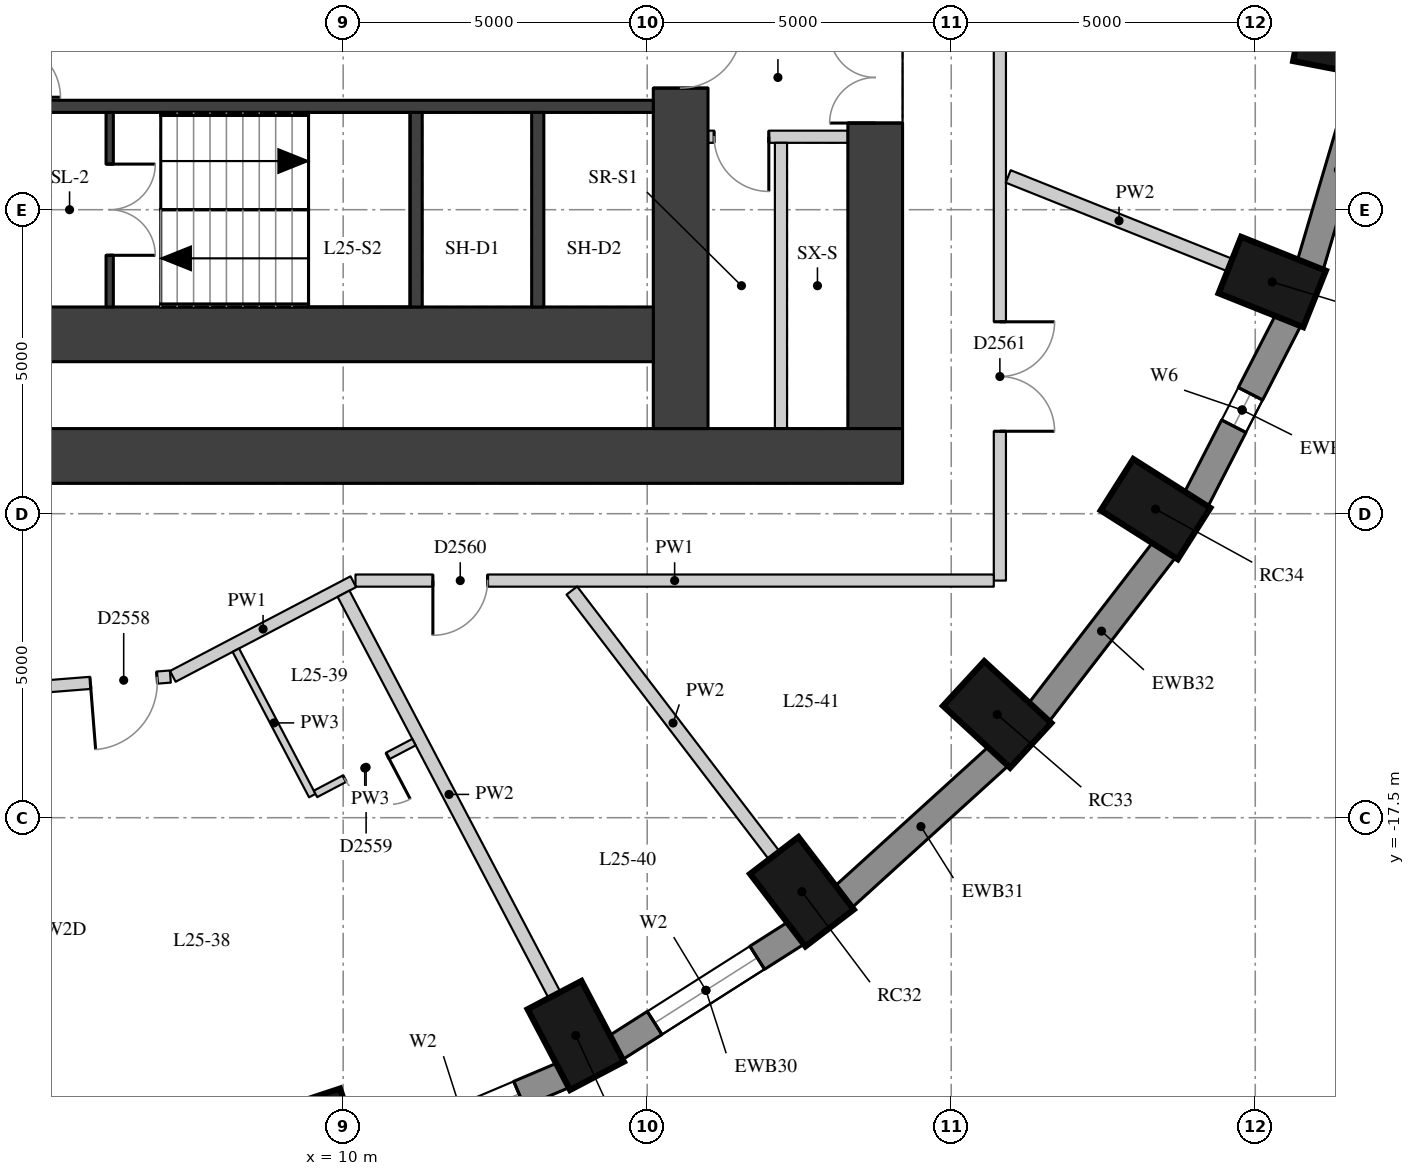
"""IFC4 building model, lengths in metres.
Left out: names, types, materials, properties, quantities, classifications, styles, units other than length and angle.
Written with IfcOpenShell. Run it as: python <this file> out.ifc"""

import sys

from ifc_helpers import new_model, si_unit, direction, frame, frame_2d, origin, origin_2d, place, context, subcontext, project, spatial, rectangle, extrude, element, fill, save


model = new_model("IFC4")
c1 = context("Model", 3, precision=1e-05, world=origin(), true_north=direction((0.0, 1.0)))
c2 = subcontext(c1, "Body", "Model", "MODEL_VIEW")
j1 = project(units=[si_unit("LENGTHUNIT", "METRE"), si_unit("PLANEANGLEUNIT", "RADIAN")], contexts=[c1])
p1 = place(None, origin())
s1 = spatial("IfcSite", under=j1, at=p1, CompositionType="ELEMENT")
p2 = place(p1, origin())
s2 = spatial("IfcBuilding", under=s1, at=p2, CompositionType="ELEMENT")
p3 = place(p2, frame((0.0, 0.0, 92.2)))
s3 = spatial("IfcBuildingStorey", under=s2, at=p3, CompositionType="ELEMENT", Elevation=92.2)
for number, where, z_axis, x_axis in (
    (1, (9.71, -22.824, 0.0), (0.0, 0.0, 1.0), (0.315, -0.949, 0.0)),
    (2, (13.825, -21.082, 0.0), (0.0, 0.0, 1.0), (0.465, -0.885, 0.0)),
    (3, (17.545, -18.717, 0.0), (0.0, 0.0, 1.0), (0.607, -0.795, 0.0)),
    (4, (20.755, -15.802, 0.0), (0.0, 0.0, 1.0), (0.735, -0.678, 0.0)),
    (5, (23.36, -12.425, 0.0), (0.0, 0.0, 1.0), (0.845, -0.536, 0.0)),
    (6, (25.279, -8.689, 0.0), (0.0, 0.0, 1.0), (0.929, -0.371, 0.0)),
    (7, (26.454, -4.707, 0.0), (0.0, 0.0, 1.0), (0.982, -0.19, 0.0)),
):
    element("IfcColumn", number, at=place(p3, frame(where, z_axis=z_axis, x_axis=x_axis)), inside=s3, PredefinedType="COLUMN", context=c2, shape_type="SweptSolid", body=[
        extrude(rectangle(XDim=1.5, YDim=1.0, at=origin_2d()), origin(), (0.0, 0.0, 1.0), 3.3),
    ])
p4 = place(p3, frame((10.318, -23.134, 0.0), z_axis=(0.0, 0.0, 1.0), x_axis=(0.920869643542, 0.389870619055, 0.0)))
e8 = element("IfcWall", 8, at=p4, inside=s3, PredefinedType="SOLIDWALL", context=c2, shape_type="SweptSolid", body=[
    extrude(rectangle(XDim=3.591, YDim=0.45, at=frame_2d((1.796, 0.0))), origin(), (0.0, 0.0, 1.0), 3.02),
])
p5 = place(p4, frame((0.796, 0.0, 0.4)))
e9 = element("IfcOpeningElement", 9, at=p5, cuts=e8, PredefinedType="OPENING", context=c2, shape_type="SweptSolid", body=[
    extrude(rectangle(XDim=2.0, YDim=1.75, at=frame_2d((1.0, 0.875))), frame((0.0, 0.235, 0.0), z_axis=(0.0, -1.0, 0.0), x_axis=(1.0, 0.0, 0.0)), (0.0, 0.0, 1.0), 0.47),
])
p6 = place(p3, frame((14.475, -21.287, 0.0), z_axis=(0.0, 0.0, 1.0), x_axis=(0.843911841423, 0.536481876587, 0.0)))
e10 = element("IfcWall", 10, at=p6, inside=s3, PredefinedType="SOLIDWALL", context=c2, shape_type="SweptSolid", body=[
    extrude(rectangle(XDim=3.532, YDim=0.45, at=frame_2d((1.766, 0.0))), origin(), (0.0, 0.0, 1.0), 3.02),
])
p7 = place(p6, frame((0.766, 0.0, 0.4)))
e11 = element("IfcOpeningElement", 11, at=p7, cuts=e10, PredefinedType="OPENING", context=c2, shape_type="SweptSolid", body=[
    extrude(rectangle(XDim=2.0, YDim=1.75, at=frame_2d((1.0, 0.875))), frame((0.0, 0.235, 0.0), z_axis=(0.0, -1.0, 0.0), x_axis=(1.0, 0.0, 0.0)), (0.0, 0.0, 1.0), 0.47),
])
p8 = place(p3, frame((18.219, -18.81, 0.0), z_axis=(0.0, 0.0, 1.0), x_axis=(0.740364106106, 0.672206062446, 0.0)))
e12 = element("IfcWall", 12, at=p8, inside=s3, PredefinedType="SOLIDWALL", context=c2, shape_type="SweptSolid", body=[
    extrude(rectangle(XDim=3.464, YDim=0.45, at=frame_2d((1.732, 0.0))), origin(), (0.0, 0.0, 1.0), 3.02),
])
p9 = place(p3, frame((21.435, -15.775, 0.0), z_axis=(0.0, 0.0, 1.0), x_axis=(0.610693945156, 0.791866721961, 0.0)))
e13 = element("IfcWall", 13, at=p9, inside=s3, PredefinedType="SOLIDWALL", context=c2, shape_type="SweptSolid", body=[
    extrude(rectangle(XDim=3.395, YDim=0.45, at=frame_2d((1.697, 0.0))), origin(), (0.0, 0.0, 1.0), 3.02),
])
p10 = place(p3, frame((24.023, -12.277, 0.0), z_axis=(0.0, 0.0, 1.0), x_axis=(0.456828186229, 0.889554949549, 0.0)))
e14 = element("IfcWall", 14, at=p10, inside=s3, PredefinedType="SOLIDWALL", context=c2, shape_type="SweptSolid", body=[
    extrude(rectangle(XDim=3.333, YDim=0.45, at=frame_2d((1.667, 0.0))), origin(), (0.0, 0.0, 1.0), 3.02),
])
p11 = place(p10, frame((1.366, 0.0, 0.4)))
e15 = element("IfcOpeningElement", 15, at=p11, cuts=e14, PredefinedType="OPENING", context=c2, shape_type="SweptSolid", body=[
    extrude(rectangle(XDim=0.6, YDim=1.75, at=frame_2d((0.3, 0.875))), frame((0.0, 0.235, 0.0), z_axis=(0.0, -1.0, 0.0), x_axis=(1.0, 0.0, 0.0)), (0.0, 0.0, 1.0), 0.47),
])
p12 = place(p3, frame((25.902, -8.421, 0.0), z_axis=(0.0, 0.0, 1.0), x_axis=(0.282982737009, 0.95912500257, 0.0)))
e16 = element("IfcWall", 16, at=p12, inside=s3, PredefinedType="SOLIDWALL", context=c2, shape_type="SweptSolid", body=[
    extrude(rectangle(XDim=3.286, YDim=0.45, at=frame_2d((1.643, 0.0))), origin(), (0.0, 0.0, 1.0), 3.02),
])
p13 = place(p3, frame((18.75, -11.1, 0.0), z_axis=(0.0, 0.0, 1.0), x_axis=(0.0, 1.0, 0.0)))
e17 = element("IfcWall", 17, at=p13, inside=s3, PredefinedType="SHEAR", context=c2, shape_type="SweptSolid", body=[
    extrude(rectangle(XDim=22.2, YDim=0.9, at=frame_2d((11.1, 0.0))), origin(), (0.0, 0.0, 1.0), 3.02),
])
p14 = place(p13, frame((16.175, 0.0, 0.0)))
e18 = element("IfcOpeningElement", 18, at=p14, cuts=e17, PredefinedType="OPENING", context=c2, shape_type="SweptSolid", body=[
    extrude(rectangle(XDim=1.5, YDim=2.1, at=frame_2d((0.75, 1.05))), frame((0.0, 0.46, 0.0), z_axis=(0.0, -1.0, 0.0), x_axis=(1.0, 0.0, 0.0)), (0.0, 0.0, 1.0), 0.92),
])
p15 = place(p13, frame((5.025, 0.0, 0.0)))
e19 = element("IfcOpeningElement", 19, at=p15, cuts=e17, PredefinedType="OPENING", context=c2, shape_type="SweptSolid", body=[
    extrude(rectangle(XDim=1.5, YDim=2.1, at=frame_2d((0.75, 1.05))), frame((0.0, 0.46, 0.0), z_axis=(0.0, -1.0, 0.0), x_axis=(1.0, 0.0, 0.0)), (0.0, 0.0, 1.0), 0.92),
])
p16 = place(p3, frame((4.0, -11.55, 0.0), z_axis=(0.0, 0.0, 1.0), x_axis=(1.0, 0.0, 0.0)))
e20 = element("IfcWall", 20, at=p16, inside=s3, PredefinedType="SHEAR", context=c2, shape_type="SweptSolid", body=[
    extrude(rectangle(XDim=15.2, YDim=0.9, at=frame_2d((7.6, 0.0))), origin(), (0.0, 0.0, 1.0), 3.02),
])
p17 = place(p3, frame((15.55, -11.1, 0.0), z_axis=(0.0, 0.0, 1.0), x_axis=(0.0, 1.0, 0.0)))
e21 = element("IfcWall", 21, at=p17, inside=s3, PredefinedType="SHEAR", context=c2, shape_type="SweptSolid", body=[
    extrude(rectangle(XDim=22.2, YDim=0.9, at=frame_2d((11.1, 0.0))), origin(), (0.0, 0.0, 1.0), 3.02),
])
p18 = place(p17, frame((15.6, 0.0, 0.0)))
e22 = element("IfcOpeningElement", 22, at=p18, cuts=e21, PredefinedType="OPENING", context=c2, shape_type="SweptSolid", body=[
    extrude(rectangle(XDim=1.0, YDim=2.1, at=frame_2d((0.5, 1.05))), frame((0.0, 0.46, 0.0), z_axis=(0.0, -1.0, 0.0), x_axis=(1.0, 0.0, 0.0)), (0.0, 0.0, 1.0), 0.92),
])
p19 = place(p17, frame((5.6, 0.0, 0.0)))
e23 = element("IfcOpeningElement", 23, at=p19, cuts=e21, PredefinedType="OPENING", context=c2, shape_type="SweptSolid", body=[
    extrude(rectangle(XDim=1.0, YDim=2.1, at=frame_2d((0.5, 1.05))), frame((0.0, 0.46, 0.0), z_axis=(0.0, -1.0, 0.0), x_axis=(1.0, 0.0, 0.0)), (0.0, 0.0, 1.0), 0.92),
])
p20 = place(p3, frame((4.9, -9.55, 0.0), z_axis=(0.0, 0.0, 1.0), x_axis=(1.0, 0.0, 0.0)))
e24 = element("IfcWall", 24, at=p20, inside=s3, PredefinedType="SHEAR", context=c2, shape_type="SweptSolid", body=[
    extrude(rectangle(XDim=10.2, YDim=0.9, at=frame_2d((5.1, 0.0))), origin(), (0.0, 0.0, 1.0), 3.02),
])
p21 = place(p3, frame((4.9, -5.8, 0.0), z_axis=(0.0, 0.0, 1.0), x_axis=(1.0, 0.0, 0.0)))
e25 = element("IfcWall", 25, at=p21, inside=s3, PredefinedType="SHEAR", context=c2, shape_type="SweptSolid", body=[
    extrude(rectangle(XDim=10.2, YDim=0.2, at=frame_2d((5.1, 0.0))), origin(), (0.0, 0.0, 1.0), 3.02),
])
for number, where, z_axis, x_axis in (
    (26, (11.2, -9.1, 0.0), (0.0, 0.0, 1.0), (0.0, 1.0, 0.0)),
    (27, (13.2, -9.1, 0.0), (0.0, 0.0, 1.0), (0.0, 1.0, 0.0)),
):
    element("IfcWall", number, at=place(p3, frame(where, z_axis=z_axis, x_axis=x_axis)), inside=s3, PredefinedType="SHEAR", context=c2, shape_type="SweptSolid", body=[
        extrude(rectangle(XDim=3.2, YDim=0.2, at=frame_2d((1.6, 0.0))), origin(), (0.0, 0.0, 1.0), 3.02),
    ])
p22 = place(p3, frame((6.16, -9.1, 0.0), z_axis=(0.0, 0.0, 1.0), x_axis=(0.0, 1.0, 0.0)))
e28 = element("IfcWall", 28, at=p22, inside=s3, PredefinedType="SHEAR", context=c2, shape_type="SweptSolid", body=[
    extrude(rectangle(XDim=3.2, YDim=0.12, at=frame_2d((1.6, 0.0))), origin(), (0.0, 0.0, 1.0), 3.02),
])
p23 = place(p22, frame((0.85, 0.0, 0.0)))
e29 = element("IfcOpeningElement", 29, at=p23, cuts=e28, PredefinedType="OPENING", context=c2, shape_type="SweptSolid", body=[
    extrude(rectangle(XDim=1.5, YDim=2.1, at=frame_2d((0.75, 1.05))), frame((0.0, 0.07, 0.0), z_axis=(0.0, -1.0, 0.0), x_axis=(1.0, 0.0, 0.0)), (0.0, 0.0, 1.0), 0.14),
])
p24 = place(p3, frame((16.0, -6.3, 0.0), z_axis=(0.0, 0.0, 1.0), x_axis=(1.0, 0.0, 0.0)))
e30 = element("IfcWall", 30, at=p24, inside=s3, PredefinedType="PARTITIONING", context=c2, shape_type="SweptSolid", body=[
    extrude(rectangle(XDim=2.3, YDim=0.2, at=frame_2d((1.15, 0.0))), origin(), (0.0, 0.0, 1.0), 3.02),
])
p25 = place(p24, frame((0.1, 0.0, 0.0)))
e31 = element("IfcOpeningElement", 31, at=p25, cuts=e30, PredefinedType="OPENING", context=c2, shape_type="SweptSolid", body=[
    extrude(rectangle(XDim=0.9, YDim=2.1, at=frame_2d((0.45, 1.05))), frame((0.0, 0.11, 0.0), z_axis=(0.0, -1.0, 0.0), x_axis=(1.0, 0.0, 0.0)), (0.0, 0.0, 1.0), 0.22),
])
p26 = place(p3, frame((17.2, -11.1, 0.0), z_axis=(0.0, 0.0, 1.0), x_axis=(0.0, 1.0, 0.0)))
e32 = element("IfcWall", 32, at=p26, inside=s3, PredefinedType="PARTITIONING", context=c2, shape_type="SweptSolid", body=[
    extrude(rectangle(XDim=4.7, YDim=0.2, at=frame_2d((2.35, 0.0))), origin(), (0.0, 0.0, 1.0), 3.02),
])
p27 = place(p3, frame((20.8, 13.5, 0.0), z_axis=(0.0, 0.0, 1.0), x_axis=(0.0, -1.0, 0.0)))
e33 = element("IfcWall", 33, at=p27, inside=s3, PredefinedType="PARTITIONING", context=c2, shape_type="SweptSolid", body=[
    extrude(rectangle(XDim=27.1, YDim=0.2, at=frame_2d((13.55, 0.0))), origin(), (0.0, 0.0, 1.0), 3.02),
])
p28 = place(p27, frame((22.844, 0.0, 0.0)))
e34 = element("IfcOpeningElement", 34, at=p28, cuts=e33, PredefinedType="OPENING", context=c2, shape_type="SweptSolid", body=[
    extrude(rectangle(XDim=1.8, YDim=2.1, at=frame_2d((0.9, 1.05))), frame((0.0, 0.11, 0.0), z_axis=(0.0, -1.0, 0.0), x_axis=(1.0, 0.0, 0.0)), (0.0, 0.0, 1.0), 0.22),
])
p29 = place(p27, frame((16.35, 0.0, 0.0)))
e35 = element("IfcOpeningElement", 35, at=p29, cuts=e33, PredefinedType="OPENING", context=c2, shape_type="SweptSolid", body=[
    extrude(rectangle(XDim=1.8, YDim=2.1, at=frame_2d((0.9, 1.05))), frame((0.0, 0.11, 0.0), z_axis=(0.0, -1.0, 0.0), x_axis=(1.0, 0.0, 0.0)), (0.0, 0.0, 1.0), 0.22),
])
p30 = place(p27, frame((7.996, 0.0, 0.0)))
e36 = element("IfcOpeningElement", 36, at=p30, cuts=e33, PredefinedType="OPENING", context=c2, shape_type="SweptSolid", body=[
    extrude(rectangle(XDim=1.8, YDim=2.1, at=frame_2d((0.9, 1.05))), frame((0.0, 0.11, 0.0), z_axis=(0.0, -1.0, 0.0), x_axis=(1.0, 0.0, 0.0)), (0.0, 0.0, 1.0), 0.22),
])
p31 = place(p3, frame((20.7, -13.6, 0.0), z_axis=(0.0, 0.0, 1.0), x_axis=(-1.0, 0.0, 0.0)))
e37 = element("IfcWall", 37, at=p31, inside=s3, PredefinedType="PARTITIONING", context=c2, shape_type="SweptSolid", body=[
    extrude(rectangle(XDim=10.498, YDim=0.2, at=frame_2d((5.249, 0.0))), origin(), (0.0, 0.0, 1.0), 3.02),
])
p32 = place(p31, frame((8.325, 0.0, 0.0)))
e38 = element("IfcOpeningElement", 38, at=p32, cuts=e37, PredefinedType="OPENING", context=c2, shape_type="SweptSolid", body=[
    extrude(rectangle(XDim=0.9, YDim=2.1, at=frame_2d((0.45, 1.05))), frame((0.0, 0.11, 0.0), z_axis=(0.0, -1.0, 0.0), x_axis=(1.0, 0.0, 0.0)), (0.0, 0.0, 1.0), 0.22),
])
p33 = place(p3, frame((10.167, -13.619, 0.0), z_axis=(0.0, 0.0, 1.0), x_axis=(-0.885637584774, -0.4643770757, 0.0)))
e39 = element("IfcWall", 39, at=p33, inside=s3, PredefinedType="PARTITIONING", context=c2, shape_type="SweptSolid", body=[
    extrude(rectangle(XDim=3.352, YDim=0.2, at=frame_2d((1.676, 0.0))), origin(), (0.0, 0.0, 1.0), 3.02),
])
p34 = place(p3, frame((7.158, -15.178, 0.0), z_axis=(0.0, 0.0, 1.0), x_axis=(-0.996871915552, -0.0790340685, 0.0)))
e40 = element("IfcWall", 40, at=p34, inside=s3, PredefinedType="PARTITIONING", context=c2, shape_type="SweptSolid", body=[
    extrude(rectangle(XDim=9.647, YDim=0.2, at=frame_2d((4.824, 0.0))), origin(), (0.0, 0.0, 1.0), 3.02),
])
p35 = place(p34, frame((6.588, 0.0, 0.0)))
e41 = element("IfcOpeningElement", 41, at=p35, cuts=e40, PredefinedType="OPENING", context=c2, shape_type="SweptSolid", body=[
    extrude(rectangle(XDim=1.0, YDim=2.1, at=frame_2d((0.5, 1.05))), frame((0.0, 0.11, 0.0), z_axis=(0.0, -1.0, 0.0), x_axis=(1.0, 0.0, 0.0)), (0.0, 0.0, 1.0), 0.22),
])
p36 = place(p34, frame((4.855, 0.0, 0.0)))
e42 = element("IfcOpeningElement", 42, at=p36, cuts=e40, PredefinedType="OPENING", context=c2, shape_type="SweptSolid", body=[
    extrude(rectangle(XDim=0.9, YDim=2.1, at=frame_2d((0.45, 1.05))), frame((0.0, 0.11, 0.0), z_axis=(0.0, -1.0, 0.0), x_axis=(1.0, 0.0, 0.0)), (0.0, 0.0, 1.0), 0.22),
])
p37 = place(p34, frame((0.22, 0.0, 0.0)))
e43 = element("IfcOpeningElement", 43, at=p37, cuts=e40, PredefinedType="OPENING", context=c2, shape_type="SweptSolid", body=[
    extrude(rectangle(XDim=1.1, YDim=2.1, at=frame_2d((0.55, 1.05))), frame((0.0, 0.11, 0.0), z_axis=(0.0, -1.0, 0.0), x_axis=(1.0, 0.0, 0.0)), (0.0, 0.0, 1.0), 0.22),
])
p38 = place(p3, frame((5.205, -23.15, 0.0), z_axis=(0.0, 0.0, 1.0), x_axis=(-0.15849643951, 0.987359548828, 0.0)))
e44 = element("IfcWall", 44, at=p38, inside=s3, PredefinedType="PARTITIONING", context=c2, shape_type="SweptSolid", body=[
    extrude(rectangle(XDim=7.697, YDim=0.22, at=frame_2d((3.849, 0.0))), origin(), (0.0, 0.0, 1.0), 2.47),
])
p39 = place(p3, frame((13.476, -20.418, 0.0), z_axis=(0.0, 0.0, 1.0), x_axis=(-0.465295750937, 0.885155276864, 0.0)))
e45 = element("IfcWall", 45, at=p39, inside=s3, PredefinedType="PARTITIONING", context=c2, shape_type="SweptSolid", body=[
    extrude(rectangle(XDim=7.458, YDim=0.22, at=frame_2d((3.729, 0.0))), origin(), (0.0, 0.0, 1.0), 3.02),
])
p40 = place(p3, frame((17.089, -18.121, 0.0), z_axis=(0.0, 0.0, 1.0), x_axis=(-0.607064955951, 0.794652212767, 0.0)))
e46 = element("IfcWall", 46, at=p40, inside=s3, PredefinedType="PARTITIONING", context=c2, shape_type="SweptSolid", body=[
    extrude(rectangle(XDim=5.483, YDim=0.22, at=frame_2d((2.742, 0.0))), origin(), (0.0, 0.0, 1.0), 3.02),
])
p41 = place(p3, frame((24.583, -8.41, 0.0), z_axis=(0.0, 0.0, 1.0), x_axis=(-0.928528147853, 0.371262008083, 0.0)))
e47 = element("IfcWall", 47, at=p41, inside=s3, PredefinedType="PARTITIONING", context=c2, shape_type="SweptSolid", body=[
    extrude(rectangle(XDim=3.926, YDim=0.22, at=frame_2d((1.963, 0.0))), origin(), (0.0, 0.0, 1.0), 3.02),
])
p42 = place(p3, frame((8.235, -14.745, 0.0), z_axis=(0.0, 0.0, 1.0), x_axis=(0.46526594455, -0.885170944418, 0.0)))
e48 = element("IfcWall", 48, at=p42, inside=s3, PredefinedType="PARTITIONING", context=c2, shape_type="SweptSolid", body=[
    extrude(rectangle(XDim=2.702, YDim=0.12, at=frame_2d((1.351, 0.0))), origin(), (0.0, 0.0, 1.0), 3.02),
])
p43 = place(p3, frame((9.545, -17.109, 0.0), z_axis=(0.0, 0.0, 1.0), x_axis=(0.885143836671, 0.465317513536, 0.0)))
e49 = element("IfcWall", 49, at=p43, inside=s3, PredefinedType="PARTITIONING", context=c2, shape_type="SweptSolid", body=[
    extrude(rectangle(XDim=1.83, YDim=0.12, at=frame_2d((0.915, 0.0))), origin(), (0.0, 0.0, 1.0), 3.02),
])
p44 = place(p43, frame((0.54, 0.0, 0.0)))
e50 = element("IfcOpeningElement", 50, at=p44, cuts=e49, PredefinedType="OPENING", context=c2, shape_type="SweptSolid", body=[
    extrude(rectangle(XDim=0.8, YDim=2.1, at=frame_2d((0.4, 1.05))), frame((0.0, 0.07, 0.0), z_axis=(0.0, -1.0, 0.0), x_axis=(1.0, 0.0, 0.0)), (0.0, 0.0, 1.0), 0.14),
])
p45 = place(p5, origin())
e51 = element("IfcWindow", 51, at=p45, inside=s3, PartitioningType="SINGLE_PANEL", PredefinedType="WINDOW", context=c2, shape_type="SweptSolid", body=[
    extrude(rectangle(XDim=2.0, YDim=1.75, at=frame_2d((1.0, 0.875))), frame((0.0, 0.035, 0.0), z_axis=(0.0, -1.0, 0.0), x_axis=(1.0, 0.0, 0.0)), (0.0, 0.0, 1.0), 0.06),
])
fill(e9, e51)
p46 = place(p7, origin())
e52 = element("IfcWindow", 52, at=p46, inside=s3, PartitioningType="SINGLE_PANEL", PredefinedType="WINDOW", context=c2, shape_type="SweptSolid", body=[
    extrude(rectangle(XDim=2.0, YDim=1.75, at=frame_2d((1.0, 0.875))), frame((0.0, 0.035, 0.0), z_axis=(0.0, -1.0, 0.0), x_axis=(1.0, 0.0, 0.0)), (0.0, 0.0, 1.0), 0.06),
])
fill(e11, e52)
p47 = place(p11, origin())
e53 = element("IfcWindow", 53, at=p47, inside=s3, PartitioningType="SINGLE_PANEL", PredefinedType="WINDOW", context=c2, shape_type="SweptSolid", body=[
    extrude(rectangle(XDim=0.6, YDim=1.75, at=frame_2d((0.3, 0.875))), frame((0.0, 0.035, 0.0), z_axis=(0.0, -1.0, 0.0), x_axis=(1.0, 0.0, 0.0)), (0.0, 0.0, 1.0), 0.06),
])
fill(e15, e53)
p48 = place(p15, origin())
e54 = element("IfcDoor", 54, at=p48, inside=s3, OperationType="DOUBLE_DOOR_SINGLE_SWING", PredefinedType="DOOR", context=c2, shape_type="SweptSolid", body=[
    extrude(rectangle(XDim=1.5, YDim=2.1, at=frame_2d((0.75, 1.05))), frame((0.0, 0.025, 0.0), z_axis=(0.0, -1.0, 0.0), x_axis=(1.0, 0.0, 0.0)), (0.0, 0.0, 1.0), 0.05),
])
fill(e19, e54)
p49 = place(p23, origin())
e55 = element("IfcDoor", 55, at=p49, inside=s3, OperationType="DOUBLE_DOOR_SINGLE_SWING", PredefinedType="DOOR", context=c2, shape_type="SweptSolid", body=[
    extrude(rectangle(XDim=1.5, YDim=2.1, at=frame_2d((0.75, 1.05))), frame((0.0, 0.025, 0.0), z_axis=(0.0, -1.0, 0.0), x_axis=(1.0, 0.0, 0.0)), (0.0, 0.0, 1.0), 0.05),
])
fill(e29, e55)
p50 = place(p19, origin())
e56 = element("IfcDoor", 56, at=p50, inside=s3, OperationType="SINGLE_SWING_LEFT", PredefinedType="DOOR", context=c2, shape_type="SweptSolid", body=[
    extrude(rectangle(XDim=1.0, YDim=2.1, at=frame_2d((0.5, 1.05))), frame((0.0, 0.025, 0.0), z_axis=(0.0, -1.0, 0.0), x_axis=(1.0, 0.0, 0.0)), (0.0, 0.0, 1.0), 0.05),
])
fill(e23, e56)
p51 = place(p25, origin())
e57 = element("IfcDoor", 57, at=p51, inside=s3, OperationType="SINGLE_SWING_LEFT", PredefinedType="DOOR", context=c2, shape_type="SweptSolid", body=[
    extrude(rectangle(XDim=0.9, YDim=2.1, at=frame_2d((0.45, 1.05))), frame((0.0, 0.025, 0.0), z_axis=(0.0, -1.0, 0.0), x_axis=(1.0, 0.0, 0.0)), (0.0, 0.0, 1.0), 0.05),
])
fill(e31, e57)
p52 = place(p37, origin())
e58 = element("IfcDoor", 58, at=p52, inside=s3, OperationType="SINGLE_SWING_RIGHT", PredefinedType="DOOR", context=c2, shape_type="SweptSolid", body=[
    extrude(rectangle(XDim=1.1, YDim=2.1, at=frame_2d((0.55, 1.05))), frame((0.0, 0.025, 0.0), z_axis=(0.0, -1.0, 0.0), x_axis=(1.0, 0.0, 0.0)), (0.0, 0.0, 1.0), 0.05),
])
fill(e43, e58)
p53 = place(p44, origin())
e59 = element("IfcDoor", 59, at=p53, inside=s3, OperationType="SINGLE_SWING_LEFT", PredefinedType="DOOR", context=c2, shape_type="SweptSolid", body=[
    extrude(rectangle(XDim=0.8, YDim=2.1, at=frame_2d((0.4, 1.05))), frame((0.0, 0.025, 0.0), z_axis=(0.0, -1.0, 0.0), x_axis=(1.0, 0.0, 0.0)), (0.0, 0.0, 1.0), 0.05),
])
fill(e50, e59)
p54 = place(p32, origin())
e60 = element("IfcDoor", 60, at=p54, inside=s3, OperationType="SINGLE_SWING_RIGHT", PredefinedType="DOOR", context=c2, shape_type="SweptSolid", body=[
    extrude(rectangle(XDim=0.9, YDim=2.1, at=frame_2d((0.45, 1.05))), frame((0.0, 0.025, 0.0), z_axis=(0.0, -1.0, 0.0), x_axis=(1.0, 0.0, 0.0)), (0.0, 0.0, 1.0), 0.05),
])
fill(e38, e60)
p55 = place(p28, origin())
e61 = element("IfcDoor", 61, at=p55, inside=s3, OperationType="DOUBLE_DOOR_SINGLE_SWING", PredefinedType="DOOR", context=c2, shape_type="SweptSolid", body=[
    extrude(rectangle(XDim=1.8, YDim=2.1, at=frame_2d((0.9, 1.05))), frame((0.0, 0.025, 0.0), z_axis=(0.0, -1.0, 0.0), x_axis=(1.0, 0.0, 0.0)), (0.0, 0.0, 1.0), 0.05),
])
fill(e34, e61)
save(model, sys.argv[1])
